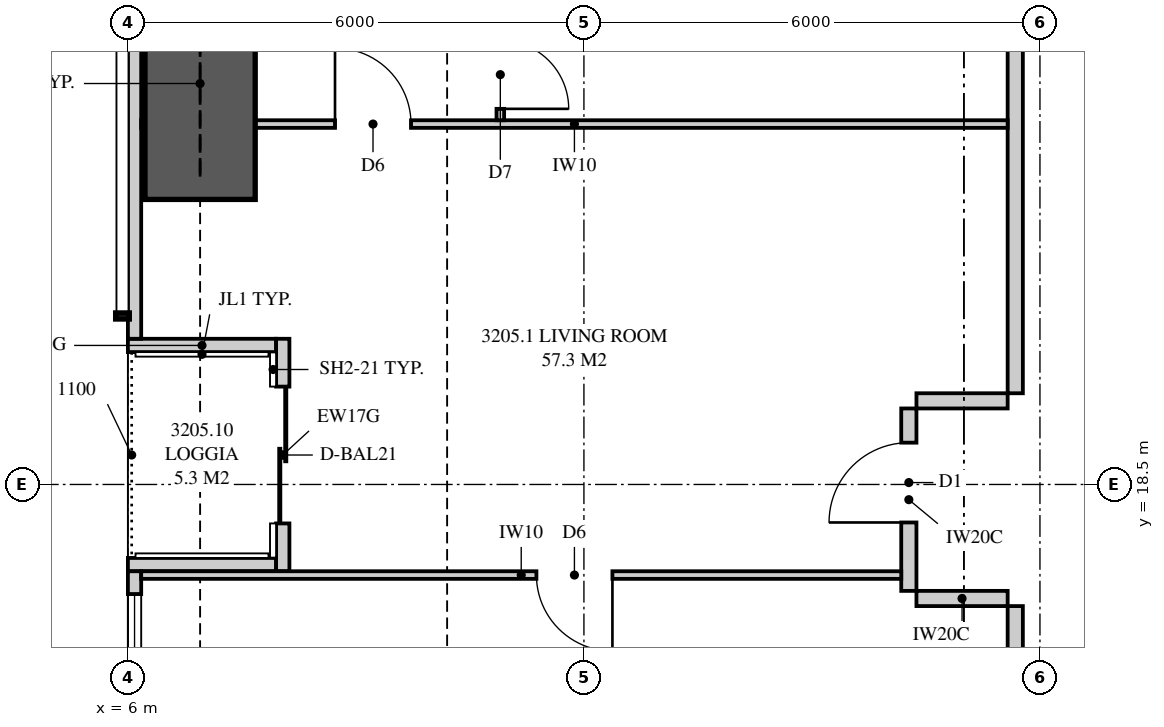
"""IFC4 building model, lengths in metres.
Left out: names, types, materials, properties, quantities, classifications, styles, units other than length and angle.
Written with IfcOpenShell. Run it as: python <this file> out.ifc"""

import sys

from ifc_helpers import new_model, si_unit, direction, frame, frame_2d, origin, place, context, subcontext, project, spatial, polyline, rectangle, outline, extrude, element, fill, save


model = new_model("IFC4")
c1 = context("Model", 3, precision=1e-05, world=origin(), true_north=direction((0.0, 1.0)))
c2 = subcontext(c1, "Body", "Model", "MODEL_VIEW")
j1 = project(units=[si_unit("LENGTHUNIT", "METRE"), si_unit("PLANEANGLEUNIT", "RADIAN")], contexts=[c1])
p1 = place(None, origin())
s1 = spatial("IfcSite", under=j1, at=p1, CompositionType="ELEMENT")
p2 = place(p1, origin())
s2 = spatial("IfcBuilding", under=s1, at=p2, CompositionType="ELEMENT")
p3 = place(p2, frame((0.0, 0.0, 118.25)))
s3 = spatial("IfcBuildingStorey", under=s2, at=p3, CompositionType="ELEMENT", Elevation=118.25)
p4 = place(p3, frame((6.087, 34.949, 0.0), z_axis=(0.0, 0.0, 1.0), x_axis=(0.0, -1.0, 0.0)))
e1 = element("IfcWall", 1, at=p4, inside=s3, PredefinedType="SOLIDWALL", context=c2, shape_type="SweptSolid", body=[
    extrude(outline(polyline([(0.0, 0.0), (14.532, 0.0), (14.532, 2.15), (9.949, 2.15), (9.949, 3.11), (9.823, 3.11), (9.823, 2.15), (9.73, 2.15), (9.73, 3.11), (0.0, 3.11), (0.0, 0.0)])), frame((0.0, 0.087, 0.0), z_axis=(0.0, -1.0, 0.0), x_axis=(1.0, 0.0, 0.0)), (0.0, 0.0, 1.0), 0.175),
])
p5 = place(p4, frame((0.636, 0.0, 0.4)))
e2 = element("IfcOpeningElement", 2, at=p5, cuts=e1, PredefinedType="OPENING", context=c2, shape_type="SweptSolid", body=[
    extrude(rectangle(XDim=2.4, YDim=1.7, at=frame_2d((1.2, 0.85))), frame((0.0, 0.097, 0.0), z_axis=(0.0, -1.0, 0.0), x_axis=(1.0, 0.0, 0.0)), (0.0, 0.0, 1.0), 0.195),
])
p6 = place(p4, frame((5.874, 0.0, 0.4)))
e3 = element("IfcOpeningElement", 3, at=p6, cuts=e1, PredefinedType="OPENING", context=c2, shape_type="SweptSolid", body=[
    extrude(rectangle(XDim=1.2, YDim=1.7, at=frame_2d((0.6, 0.85))), frame((0.0, 0.097, 0.0), z_axis=(0.0, -1.0, 0.0), x_axis=(1.0, 0.0, 0.0)), (0.0, 0.0, 1.0), 0.195),
])
p7 = place(p3, frame((6.087, 17.358, 0.0), z_axis=(0.0, 0.0, 1.0), x_axis=(0.0, -1.0, 0.0)))
e4 = element("IfcWall", 4, at=p7, inside=s3, PredefinedType="SOLIDWALL", context=c2, shape_type="SweptSolid", body=[
    extrude(outline(polyline([(0.0, 0.0), (14.307, 0.0), (14.307, 3.11), (4.577, 3.11), (4.577, 2.15), (4.484, 2.15), (4.484, 3.11), (4.358, 3.11), (4.358, 2.15), (0.0, 2.15), (0.0, 0.0)])), frame((0.0, 0.087, 0.0), z_axis=(0.0, -1.0, 0.0), x_axis=(1.0, 0.0, 0.0)), (0.0, 0.0, 1.0), 0.175),
])
p8 = place(p7, frame((0.3, 0.0, 0.4)))
e5 = element("IfcOpeningElement", 5, at=p8, cuts=e4, PredefinedType="OPENING", context=c2, shape_type="SweptSolid", body=[
    extrude(rectangle(XDim=1.2, YDim=1.7, at=frame_2d((0.6, 0.85))), frame((0.0, 0.097, 0.0), z_axis=(0.0, -1.0, 0.0), x_axis=(1.0, 0.0, 0.0)), (0.0, 0.0, 1.0), 0.195),
])
p9 = place(p7, frame((7.233, 0.0, 0.4)))
e6 = element("IfcOpeningElement", 6, at=p9, cuts=e4, PredefinedType="OPENING", context=c2, shape_type="SweptSolid", body=[
    extrude(rectangle(XDim=1.8, YDim=1.7, at=frame_2d((0.9, 0.85))), frame((0.0, 0.097, 0.0), z_axis=(0.0, -1.0, 0.0), x_axis=(1.0, 0.0, 0.0)), (0.0, 0.0, 1.0), 0.195),
])
p10 = place(p3, frame((8.038, 20.417, 0.0), z_axis=(0.0, 0.0, 1.0), x_axis=(0.0, -1.0, 0.0)))
e7 = element("IfcWall", 7, at=p10, inside=s3, PredefinedType="SOLIDWALL", context=c2, shape_type="SweptSolid", body=[
    extrude(rectangle(XDim=3.058, YDim=0.175, at=frame_2d((1.529, 0.0))), origin(), (0.0, 0.0, 1.0), 3.11),
])
p11 = place(p10, frame((0.629, 0.0, 0.0)))
e8 = element("IfcOpeningElement", 8, at=p11, cuts=e7, PredefinedType="OPENING", context=c2, shape_type="SweptSolid", body=[
    extrude(rectangle(XDim=1.8, YDim=2.1, at=frame_2d((0.9, 1.05))), frame((0.0, 0.097, 0.0), z_axis=(0.0, -1.0, 0.0), x_axis=(1.0, 0.0, 0.0)), (0.0, 0.0, 1.0), 0.195),
])
for number, where, z_axis, x_axis in (
    (9, (6.0, 20.329, 0.0), (0.0, 0.0, 1.0), (1.0, 0.0, 0.0)),
    (10, (6.0, 17.446, 0.0), (0.0, 0.0, 1.0), (1.0, 0.0, 0.0)),
):
    element("IfcWall", number, at=place(p3, frame(where, z_axis=z_axis, x_axis=x_axis)), inside=s3, PredefinedType="SOLIDWALL", context=c2, shape_type="SweptSolid", body=[
        extrude(outline(polyline([(0.0, 0.0), (1.95, 0.0), (1.95, 3.11), (1.75, 3.11), (1.75, 2.15), (0.15, 2.15), (0.15, 3.11), (0.0, 3.11), (0.0, 0.0)])), frame((0.0, 0.087, 0.0), z_axis=(0.0, -1.0, 0.0), x_axis=(1.0, 0.0, 0.0)), (0.0, 0.0, 1.0), 0.175),
    ])
p12 = place(p3, frame((17.675, 7.825, 0.0), z_axis=(0.0, 0.0, 1.0), x_axis=(0.0, 1.0, 0.0)))
e11 = element("IfcWall", 11, at=p12, inside=s3, PredefinedType="PARTITIONING", context=c2, shape_type="SweptSolid", body=[
    extrude(outline(polyline([(0.0, 0.0), (9.075, 0.0), (9.075, 3.11), (3.087, 3.11), (3.087, 2.541), (2.413, 2.541), (2.413, 3.11), (0.0, 3.11), (0.0, 0.0)])), frame((0.0, 0.1, 0.0), z_axis=(0.0, -1.0, 0.0), x_axis=(1.0, 0.0, 0.0)), (0.0, 0.0, 1.0), 0.2),
])
p13 = place(p3, frame((6.175, 17.308, 0.0), z_axis=(0.0, 0.0, 1.0), x_axis=(1.0, 0.0, 0.0)))
e12 = element("IfcWall", 12, at=p13, inside=s3, PredefinedType="PARTITIONING", context=c2, shape_type="SweptSolid", body=[
    extrude(outline(polyline([(0.0, 0.0), (10.0, 0.0), (10.0, 3.11), (5.285, 3.11), (5.285, 2.51), (2.765, 2.51), (2.765, 3.11), (1.635, 3.11), (1.635, 2.15), (0.0, 2.15), (0.0, 3.11), (0.0, 0.0)])), frame((0.0, 0.05, 0.0), z_axis=(0.0, -1.0, 0.0), x_axis=(1.0, 0.0, 0.0)), (0.0, 0.0, 1.0), 0.1),
])
p14 = place(p13, frame((5.2, 0.0, 0.0)))
e13 = element("IfcOpeningElement", 13, at=p14, cuts=e12, PredefinedType="OPENING", context=c2, shape_type="SweptSolid", body=[
    extrude(rectangle(XDim=1.0, YDim=2.1, at=frame_2d((0.5, 1.05))), frame((0.0, 0.06, 0.0), z_axis=(0.0, -1.0, 0.0), x_axis=(1.0, 0.0, 0.0)), (0.0, 0.0, 1.0), 0.12),
])
p15 = place(p3, frame((6.175, 23.242, 0.0), z_axis=(0.0, 0.0, 1.0), x_axis=(1.0, 0.0, 0.0)))
e14 = element("IfcWall", 14, at=p15, inside=s3, PredefinedType="PARTITIONING", context=c2, shape_type="SweptSolid", body=[
    extrude(outline(polyline([(0.529, 2.15), (0.0, 2.15), (0.0, 0.0), (0.529, 0.0), (0.529, 0.268), (1.021, 0.268), (1.021, 0.0), (11.4, 0.0), (11.4, 3.11), (5.285, 3.11), (5.285, 2.51), (2.765, 2.51), (2.765, 3.11), (1.635, 3.11), (1.635, 2.15), (1.021, 2.15), (1.021, 1.882), (0.529, 1.882), (0.529, 2.15)])), frame((0.0, 0.05, 0.0), z_axis=(0.0, -1.0, 0.0), x_axis=(1.0, 0.0, 0.0)), (0.0, 0.0, 1.0), 0.1),
])
p16 = place(p15, frame((2.55, 0.0, 0.0)))
e15 = element("IfcOpeningElement", 15, at=p16, cuts=e14, PredefinedType="OPENING", context=c2, shape_type="SweptSolid", body=[
    extrude(rectangle(XDim=1.0, YDim=2.1, at=frame_2d((0.5, 1.05))), frame((0.0, 0.06, 0.0), z_axis=(0.0, -1.0, 0.0), x_axis=(1.0, 0.0, 0.0)), (0.0, 0.0, 1.0), 0.12),
])
p17 = place(p3, frame((17.675, 19.7, 0.0), z_axis=(0.0, 0.0, 1.0), x_axis=(0.0, 1.0, 0.0)))
e16 = element("IfcWall", 16, at=p17, inside=s3, PredefinedType="PARTITIONING", context=c2, shape_type="SweptSolid", body=[
    extrude(outline(polyline([(0.0, 0.0), (9.475, 0.0), (9.475, 3.11), (7.062, 3.11), (7.062, 2.541), (6.388, 2.541), (6.388, 3.11), (0.0, 3.11), (0.0, 0.0)])), frame((0.0, 0.1, 0.0), z_axis=(0.0, -1.0, 0.0), x_axis=(1.0, 0.0, 0.0)), (0.0, 0.0, 1.0), 0.2),
])
p18 = place(p3, frame((16.275, 17.1, 0.0), z_axis=(0.0, 0.0, 1.0), x_axis=(0.0, 1.0, 0.0)))
e17 = element("IfcWall", 17, at=p18, inside=s3, PredefinedType="PARTITIONING", context=c2, shape_type="SweptSolid", body=[
    extrude(rectangle(XDim=2.4, YDim=0.2, at=frame_2d((1.2, 0.0))), origin(), (0.0, 0.0, 1.0), 3.11),
])
p19 = place(p18, frame((0.9, 0.0, 0.0)))
e18 = element("IfcOpeningElement", 18, at=p19, cuts=e17, PredefinedType="OPENING", context=c2, shape_type="SweptSolid", body=[
    extrude(rectangle(XDim=1.05, YDim=2.2, at=frame_2d((0.525, 1.1))), frame((0.0, 0.11, 0.0), z_axis=(0.0, -1.0, 0.0), x_axis=(1.0, 0.0, 0.0)), (0.0, 0.0, 1.0), 0.22),
])
for number, where, z_axis, x_axis in (
    (19, (17.575, 17.0, 0.0), (0.0, 0.0, 1.0), (-1.0, 0.0, 0.0)),
    (20, (17.575, 19.6, 0.0), (0.0, 0.0, 1.0), (-1.0, 0.0, 0.0)),
):
    element("IfcWall", number, at=place(p3, frame(where, z_axis=z_axis, x_axis=x_axis)), inside=s3, PredefinedType="PARTITIONING", context=c2, shape_type="SweptSolid", body=[
        extrude(rectangle(XDim=1.2, YDim=0.2, at=frame_2d((0.6, 0.0))), origin(), (0.0, 0.0, 1.0), 3.11),
    ])
p20 = place(p3, frame((10.9, 23.292, 0.0), z_axis=(0.0, 0.0, 1.0), x_axis=(0.0, 1.0, 0.0)))
e21 = element("IfcWall", 21, at=p20, inside=s3, PredefinedType="PARTITIONING", context=c2, shape_type="SweptSolid", body=[
    extrude(outline(polyline([(0.0, 0.0), (5.883, 0.0), (5.883, 3.11), (5.883, 2.51), (1.768, 2.51), (0.0, 2.51), (0.0, 3.11), (0.0, 0.0)])), frame((0.0, 0.05, 0.0), z_axis=(0.0, -1.0, 0.0), x_axis=(1.0, 0.0, 0.0)), (0.0, 0.0, 1.0), 0.1),
])
p21 = place(p20, frame((0.15, 0.0, 0.0)))
e22 = element("IfcOpeningElement", 22, at=p21, cuts=e21, PredefinedType="OPENING", context=c2, shape_type="SweptSolid", body=[
    extrude(rectangle(XDim=0.9, YDim=2.1, at=frame_2d((0.45, 1.05))), frame((0.0, 0.06, 0.0), z_axis=(0.0, -1.0, 0.0), x_axis=(1.0, 0.0, 0.0)), (0.0, 0.0, 1.0), 0.12),
])
p22 = place(p20, frame((4.017, 0.0, 0.0)))
e23 = element("IfcOpeningElement", 23, at=p22, cuts=e21, PredefinedType="OPENING", context=c2, shape_type="SweptSolid", body=[
    extrude(rectangle(XDim=0.9, YDim=2.1, at=frame_2d((0.45, 1.05))), frame((0.0, 0.06, 0.0), z_axis=(0.0, -1.0, 0.0), x_axis=(1.0, 0.0, 0.0)), (0.0, 0.0, 1.0), 0.12),
])
p23 = place(p3, frame((6.95, 22.25, 0.0), z_axis=(0.0, 0.0, 1.0), x_axis=(0.0, 1.0, 0.0)))
e24 = element("IfcWall", 24, at=p23, inside=s3, PredefinedType="SHEAR", context=c2, shape_type="SweptSolid", body=[
    extrude(rectangle(XDim=5.5, YDim=1.45, at=frame_2d((2.75, 0.0))), origin(), (0.0, 0.0, 1.0), 3.35),
])
p24 = place(p11, origin())
e25 = element("IfcDoor", 25, at=p24, inside=s3, OperationType="SLIDING_TO_LEFT", PredefinedType="DOOR", context=c2, shape_type="SweptSolid", body=[
    extrude(rectangle(XDim=1.8, YDim=2.1, at=frame_2d((0.9, 1.05))), frame((0.0, 0.025, 0.0), z_axis=(0.0, -1.0, 0.0), x_axis=(1.0, 0.0, 0.0)), (0.0, 0.0, 1.0), 0.05),
])
fill(e8, e25)
p25 = place(p8, origin())
e26 = element("IfcWindow", 26, at=p25, inside=s3, PartitioningType="SINGLE_PANEL", PredefinedType="WINDOW", context=c2, shape_type="SweptSolid", body=[
    extrude(rectangle(XDim=1.2, YDim=1.7, at=frame_2d((0.6, 0.85))), frame((0.0, 0.03, 0.0), z_axis=(0.0, -1.0, 0.0), x_axis=(1.0, 0.0, 0.0)), (0.0, 0.0, 1.0), 0.06),
])
fill(e5, e26)
p26 = place(p19, origin())
e27 = element("IfcDoor", 27, at=p26, inside=s3, OperationType="SINGLE_SWING_LEFT", PredefinedType="DOOR", context=c2, shape_type="SweptSolid", body=[
    extrude(rectangle(XDim=1.05, YDim=2.2, at=frame_2d((0.525, 1.1))), frame((0.0, 0.025, 0.0), z_axis=(0.0, -1.0, 0.0), x_axis=(1.0, 0.0, 0.0)), (0.0, 0.0, 1.0), 0.05),
])
fill(e18, e27)
p27 = place(p14, frame((1.0, 0.0, 0.0), z_axis=(0.0, 0.0, 1.0), x_axis=(-1.0, 0.0, 0.0)))
e28 = element("IfcDoor", 28, at=p27, inside=s3, OperationType="SINGLE_SWING_LEFT", PredefinedType="DOOR", context=c2, shape_type="SweptSolid", body=[
    extrude(rectangle(XDim=1.0, YDim=2.1, at=frame_2d((0.5, 1.05))), frame((0.0, 0.025, 0.0), z_axis=(0.0, -1.0, 0.0), x_axis=(1.0, 0.0, 0.0)), (0.0, 0.0, 1.0), 0.05),
])
fill(e13, e28)
p28 = place(p16, origin())
e29 = element("IfcDoor", 29, at=p28, inside=s3, OperationType="SINGLE_SWING_LEFT", PredefinedType="DOOR", context=c2, shape_type="SweptSolid", body=[
    extrude(rectangle(XDim=1.0, YDim=2.1, at=frame_2d((0.5, 1.05))), frame((0.0, 0.025, 0.0), z_axis=(0.0, -1.0, 0.0), x_axis=(1.0, 0.0, 0.0)), (0.0, 0.0, 1.0), 0.05),
])
fill(e15, e29)
p29 = place(p21, frame((0.9, 0.0, 0.0), z_axis=(0.0, 0.0, 1.0), x_axis=(-1.0, 0.0, 0.0)))
e30 = element("IfcDoor", 30, at=p29, inside=s3, OperationType="SINGLE_SWING_RIGHT", PredefinedType="DOOR", context=c2, shape_type="SweptSolid", body=[
    extrude(rectangle(XDim=0.9, YDim=2.1, at=frame_2d((0.45, 1.05))), frame((0.0, 0.025, 0.0), z_axis=(0.0, -1.0, 0.0), x_axis=(1.0, 0.0, 0.0)), (0.0, 0.0, 1.0), 0.05),
])
fill(e22, e30)
save(model, sys.argv[1])
